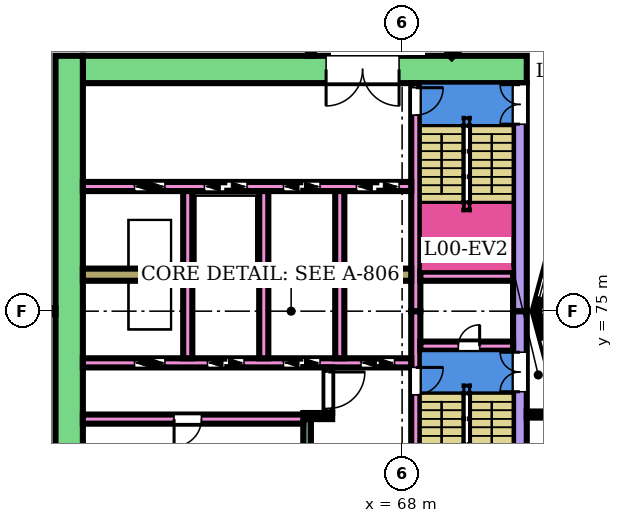
"""IFC4 building model, lengths in metres.
Left out: names, types, materials, properties, quantities, classifications, styles, units other than length and angle.
Written with IfcOpenShell. Run it as: python <this file> out.ifc"""

import sys

from ifc_helpers import new_model, si_unit, direction, frame, frame_2d, origin, place, context, subcontext, project, spatial, rectangle, extrude, element, fill, save


model = new_model("IFC4")
c1 = context("Model", 3, precision=1e-05, world=origin(), true_north=direction((0.0, 1.0)))
c2 = subcontext(c1, "Body", "Model", "MODEL_VIEW")
j1 = project(units=[si_unit("LENGTHUNIT", "METRE"), si_unit("PLANEANGLEUNIT", "RADIAN")], contexts=[c1])
p1 = place(None, origin())
s1 = spatial("IfcSite", under=j1, at=p1, CompositionType="ELEMENT")
p2 = place(p1, origin())
s2 = spatial("IfcBuilding", under=s1, at=p2, CompositionType="ELEMENT")
p3 = place(p2, origin())
s3 = spatial("IfcBuildingStorey", under=s2, at=p3, CompositionType="ELEMENT", Elevation=0.0)
p4 = place(p3, frame((72.1, 82.95, 0.0), z_axis=(0.0, 0.0, 1.0), x_axis=(-1.0, 0.0, 0.0)))
e1 = element("IfcWall", 1, at=p4, inside=s3, PredefinedType="SHEAR", context=c2, shape_type="SweptSolid", body=[
    extrude(rectangle(XDim=14.6, YDim=0.9, at=frame_2d((7.3, 0.0))), origin(), (0.0, 0.0, 1.0), 6.55),
])
p5 = place(p4, frame((4.2, 0.0, 0.0)))
e2 = element("IfcOpeningElement", 2, at=p5, cuts=e1, PredefinedType="OPENING", context=c2, shape_type="SweptSolid", body=[
    extrude(rectangle(XDim=2.4, YDim=2.4, at=frame_2d((1.2, 1.2))), frame((0.0, 0.46, 0.0), z_axis=(0.0, -1.0, 0.0), x_axis=(1.0, 0.0, 0.0)), (0.0, 0.0, 1.0), 0.92),
])
p6 = place(p3, frame((71.875, 75.0, 0.0), z_axis=(0.0, 0.0, 1.0), x_axis=(0.0, -1.0, 0.0)))
e3 = element("IfcWall", 3, at=p6, inside=s3, PredefinedType="SHEAR", context=c2, shape_type="SweptSolid", body=[
    extrude(rectangle(XDim=7.5, YDim=0.45, at=frame_2d((3.75, 0.0))), origin(), (0.0, 0.0, 1.0), 6.55),
])
p7 = place(p6, frame((1.35, 0.0, 0.0)))
e4 = element("IfcOpeningElement", 4, at=p7, cuts=e3, PredefinedType="OPENING", context=c2, shape_type="SweptSolid", body=[
    extrude(rectangle(XDim=1.3, YDim=2.4, at=frame_2d((0.65, 1.2))), frame((0.0, 0.235, 0.0), z_axis=(0.0, -1.0, 0.0), x_axis=(1.0, 0.0, 0.0)), (0.0, 0.0, 1.0), 0.47),
])
p8 = place(p3, frame((71.875, 82.5, 0.0), z_axis=(0.0, 0.0, 1.0), x_axis=(0.0, -1.0, 0.0)))
e5 = element("IfcWall", 5, at=p8, inside=s3, PredefinedType="SHEAR", context=c2, shape_type="SweptSolid", body=[
    extrude(rectangle(XDim=7.5, YDim=0.45, at=frame_2d((3.75, 0.0))), origin(), (0.0, 0.0, 1.0), 6.55),
])
p9 = place(p8, frame((0.05, 0.0, 0.0)))
e6 = element("IfcOpeningElement", 6, at=p9, cuts=e5, PredefinedType="OPENING", context=c2, shape_type="SweptSolid", body=[
    extrude(rectangle(XDim=1.3, YDim=2.4, at=frame_2d((0.65, 1.2))), frame((0.0, 0.235, 0.0), z_axis=(0.0, -1.0, 0.0), x_axis=(1.0, 0.0, 0.0)), (0.0, 0.0, 1.0), 0.47),
])
p10 = place(p3, frame((57.05, 83.4, 0.0), z_axis=(0.0, 0.0, 1.0), x_axis=(0.0, -1.0, 0.0)))
e7 = element("IfcWall", 7, at=p10, inside=s3, PredefinedType="SHEAR", context=c2, shape_type="SweptSolid", body=[
    extrude(rectangle(XDim=16.8, YDim=0.9, at=frame_2d((8.4, 0.0))), origin(), (0.0, 0.0, 1.0), 6.55),
])
p11 = place(p3, frame((68.45, 75.0, 0.0), z_axis=(0.0, 0.0, 1.0), x_axis=(0.0, -1.0, 0.0)))
e8 = element("IfcWall", 8, at=p11, inside=s3, PredefinedType="SHEAR", context=c2, shape_type="SweptSolid", body=[
    extrude(rectangle(XDim=7.5, YDim=0.3, at=frame_2d((3.75, 0.0))), origin(), (0.0, 0.0, 1.0), 6.55),
])
p12 = place(p11, frame((1.85, 0.0, 0.0)))
e9 = element("IfcOpeningElement", 9, at=p12, cuts=e8, PredefinedType="OPENING", context=c2, shape_type="SweptSolid", body=[
    extrude(rectangle(XDim=0.9, YDim=2.1, at=frame_2d((0.45, 1.05))), frame((0.0, 0.16, 0.0), z_axis=(0.0, -1.0, 0.0), x_axis=(1.0, 0.0, 0.0)), (0.0, 0.0, 1.0), 0.32),
])
p13 = place(p3, frame((68.45, 82.5, 0.0), z_axis=(0.0, 0.0, 1.0), x_axis=(0.0, -1.0, 0.0)))
e10 = element("IfcWall", 10, at=p13, inside=s3, PredefinedType="SHEAR", context=c2, shape_type="SweptSolid", body=[
    extrude(rectangle(XDim=7.5, YDim=0.3, at=frame_2d((3.75, 0.0))), origin(), (0.0, 0.0, 1.0), 6.55),
])
p14 = place(p13, frame((0.15, 0.0, 0.0)))
e11 = element("IfcOpeningElement", 11, at=p14, cuts=e10, PredefinedType="OPENING", context=c2, shape_type="SweptSolid", body=[
    extrude(rectangle(XDim=0.9, YDim=2.1, at=frame_2d((0.45, 1.05))), frame((0.0, 0.16, 0.0), z_axis=(0.0, -1.0, 0.0), x_axis=(1.0, 0.0, 0.0)), (0.0, 0.0, 1.0), 0.32),
])
p15 = place(p3, frame((71.65, 73.85, 0.0), z_axis=(0.0, 0.0, 1.0), x_axis=(-1.0, 0.0, 0.0)))
e12 = element("IfcWall", 12, at=p15, inside=s3, PredefinedType="SHEAR", context=c2, shape_type="SweptSolid", body=[
    extrude(rectangle(XDim=3.05, YDim=0.3, at=frame_2d((1.525, 0.0))), origin(), (0.0, 0.0, 1.0), 6.55),
])
p16 = place(p15, frame((1.1, 0.0, 0.0)))
e13 = element("IfcOpeningElement", 13, at=p16, cuts=e12, PredefinedType="OPENING", context=c2, shape_type="SweptSolid", body=[
    extrude(rectangle(XDim=0.7, YDim=2.0, at=frame_2d((0.35, 1.0))), frame((0.0, 0.16, 0.0), z_axis=(0.0, -1.0, 0.0), x_axis=(1.0, 0.0, 0.0)), (0.0, 0.0, 1.0), 0.32),
])
p17 = place(p3, frame((71.65, 76.15, 0.0), z_axis=(0.0, 0.0, 1.0), x_axis=(-1.0, 0.0, 0.0)))
e14 = element("IfcWall", 14, at=p17, inside=s3, PredefinedType="SHEAR", context=c2, shape_type="SweptSolid", body=[
    extrude(rectangle(XDim=3.05, YDim=0.3, at=frame_2d((1.525, 0.0))), origin(), (0.0, 0.0, 1.0), 6.55),
])
p18 = place(p3, frame((68.3, 73.3, 0.0), z_axis=(0.0, 0.0, 1.0), x_axis=(-1.0, 0.0, 0.0)))
e15 = element("IfcWall", 15, at=p18, inside=s3, PredefinedType="SHEAR", context=c2, shape_type="SweptSolid", body=[
    extrude(rectangle(XDim=10.8, YDim=0.3, at=frame_2d((5.4, 0.0))), origin(), (0.0, 0.0, 1.0), 6.55),
])
p19 = place(p18, frame((0.55, 0.0, 0.0)))
e16 = element("IfcOpeningElement", 16, at=p19, cuts=e15, PredefinedType="OPENING", context=c2, shape_type="SweptSolid", body=[
    extrude(rectangle(XDim=1.1, YDim=2.1, at=frame_2d((0.55, 1.05))), frame((0.0, 0.16, 0.0), z_axis=(0.0, -1.0, 0.0), x_axis=(1.0, 0.0, 0.0)), (0.0, 0.0, 1.0), 0.32),
])
p20 = place(p18, frame((3.0, 0.0, 0.0)))
e17 = element("IfcOpeningElement", 17, at=p20, cuts=e15, PredefinedType="OPENING", context=c2, shape_type="SweptSolid", body=[
    extrude(rectangle(XDim=1.2, YDim=2.1, at=frame_2d((0.6, 1.05))), frame((0.0, 0.16, 0.0), z_axis=(0.0, -1.0, 0.0), x_axis=(1.0, 0.0, 0.0)), (0.0, 0.0, 1.0), 0.32),
])
p21 = place(p18, frame((5.5, 0.0, 0.0)))
e18 = element("IfcOpeningElement", 18, at=p21, cuts=e15, PredefinedType="OPENING", context=c2, shape_type="SweptSolid", body=[
    extrude(rectangle(XDim=1.2, YDim=2.1, at=frame_2d((0.6, 1.05))), frame((0.0, 0.16, 0.0), z_axis=(0.0, -1.0, 0.0), x_axis=(1.0, 0.0, 0.0)), (0.0, 0.0, 1.0), 0.32),
])
p22 = place(p18, frame((8.1, 0.0, 0.0)))
e19 = element("IfcOpeningElement", 19, at=p22, cuts=e15, PredefinedType="OPENING", context=c2, shape_type="SweptSolid", body=[
    extrude(rectangle(XDim=1.0, YDim=2.1, at=frame_2d((0.5, 1.05))), frame((0.0, 0.16, 0.0), z_axis=(0.0, -1.0, 0.0), x_axis=(1.0, 0.0, 0.0)), (0.0, 0.0, 1.0), 0.32),
])
p23 = place(p3, frame((68.3, 76.2, 0.0), z_axis=(0.0, 0.0, 1.0), x_axis=(-1.0, 0.0, 0.0)))
e20 = element("IfcWall", 20, at=p23, inside=s3, PredefinedType="SHEAR", context=c2, shape_type="SweptSolid", body=[
    extrude(rectangle(XDim=10.8, YDim=0.4, at=frame_2d((5.4, 0.0))), origin(), (0.0, 0.0, 1.0), 6.55),
])
p24 = place(p3, frame((68.3, 79.1, 0.0), z_axis=(0.0, 0.0, 1.0), x_axis=(-1.0, 0.0, 0.0)))
e21 = element("IfcWall", 21, at=p24, inside=s3, PredefinedType="SHEAR", context=c2, shape_type="SweptSolid", body=[
    extrude(rectangle(XDim=10.8, YDim=0.3, at=frame_2d((5.4, 0.0))), origin(), (0.0, 0.0, 1.0), 6.55),
])
p25 = place(p24, frame((0.4, 0.0, 0.0)))
e22 = element("IfcOpeningElement", 22, at=p25, cuts=e21, PredefinedType="OPENING", context=c2, shape_type="SweptSolid", body=[
    extrude(rectangle(XDim=1.4, YDim=2.1, at=frame_2d((0.7, 1.05))), frame((0.0, 0.16, 0.0), z_axis=(0.0, -1.0, 0.0), x_axis=(1.0, 0.0, 0.0)), (0.0, 0.0, 1.0), 0.32),
])
p26 = place(p24, frame((3.0, 0.0, 0.0)))
e23 = element("IfcOpeningElement", 23, at=p26, cuts=e21, PredefinedType="OPENING", context=c2, shape_type="SweptSolid", body=[
    extrude(rectangle(XDim=1.2, YDim=2.1, at=frame_2d((0.6, 1.05))), frame((0.0, 0.16, 0.0), z_axis=(0.0, -1.0, 0.0), x_axis=(1.0, 0.0, 0.0)), (0.0, 0.0, 1.0), 0.32),
])
p27 = place(p24, frame((5.4, 0.0, 0.0)))
e24 = element("IfcOpeningElement", 24, at=p27, cuts=e21, PredefinedType="OPENING", context=c2, shape_type="SweptSolid", body=[
    extrude(rectangle(XDim=1.4, YDim=2.1, at=frame_2d((0.7, 1.05))), frame((0.0, 0.16, 0.0), z_axis=(0.0, -1.0, 0.0), x_axis=(1.0, 0.0, 0.0)), (0.0, 0.0, 1.0), 0.32),
])
p28 = place(p24, frame((8.1, 0.0, 0.0)))
e25 = element("IfcOpeningElement", 25, at=p28, cuts=e21, PredefinedType="OPENING", context=c2, shape_type="SweptSolid", body=[
    extrude(rectangle(XDim=1.0, YDim=2.1, at=frame_2d((0.5, 1.05))), frame((0.0, 0.16, 0.0), z_axis=(0.0, -1.0, 0.0), x_axis=(1.0, 0.0, 0.0)), (0.0, 0.0, 1.0), 0.32),
])
for number, where, z_axis, x_axis in (
    (26, (65.95, 76.0, 0.0), (0.0, 0.0, 1.0), (0.0, -1.0, 0.0)),
    (27, (63.45, 76.0, 0.0), (0.0, 0.0, 1.0), (0.0, -1.0, 0.0)),
    (28, (60.95, 76.0, 0.0), (0.0, 0.0, 1.0), (0.0, -1.0, 0.0)),
    (29, (65.95, 78.95, 0.0), (0.0, 0.0, 1.0), (0.0, -1.0, 0.0)),
    (30, (63.45, 78.95, 0.0), (0.0, 0.0, 1.0), (0.0, -1.0, 0.0)),
    (31, (60.95, 78.95, 0.0), (0.0, 0.0, 1.0), (0.0, -1.0, 0.0)),
):
    element("IfcWall", number, at=place(p3, frame(where, z_axis=z_axis, x_axis=x_axis)), inside=s3, PredefinedType="SHEAR", context=c2, shape_type="SweptSolid", body=[
        extrude(rectangle(XDim=2.55, YDim=0.3, at=frame_2d((1.275, 0.0))), origin(), (0.0, 0.0, 1.0), 6.55),
    ])
p29 = place(p3, frame((64.875, 71.45, 0.0), z_axis=(0.0, 0.0, 1.0), x_axis=(0.0, -1.0, 0.0)))
e32 = element("IfcWall", 32, at=p29, inside=s3, PredefinedType="SHEAR", context=c2, shape_type="SweptSolid", body=[
    extrude(rectangle(XDim=3.95, YDim=0.25, at=frame_2d((1.975, 0.0))), origin(), (0.0, 0.0, 1.0), 6.55),
])
p30 = place(p3, frame((65.7, 71.55, 0.0), z_axis=(0.0, 0.0, 1.0), x_axis=(-1.0, 0.0, 0.0)))
e33 = element("IfcWall", 33, at=p30, inside=s3, PredefinedType="SHEAR", context=c2, shape_type="SweptSolid", body=[
    extrude(rectangle(XDim=0.95, YDim=0.2, at=frame_2d((0.475, 0.0))), origin(), (0.0, 0.0, 1.0), 6.55),
])
p31 = place(p3, frame((65.575, 73.15, 0.0), z_axis=(0.0, 0.0, 1.0), x_axis=(0.0, -1.0, 0.0)))
e34 = element("IfcWall", 34, at=p31, inside=s3, PredefinedType="SHEAR", context=c2, shape_type="SweptSolid", body=[
    extrude(rectangle(XDim=1.5, YDim=0.25, at=frame_2d((0.75, 0.0))), origin(), (0.0, 0.0, 1.0), 6.55),
])
p32 = place(p31, frame((0.15, 0.0, 0.0)))
e35 = element("IfcOpeningElement", 35, at=p32, cuts=e34, PredefinedType="OPENING", context=c2, shape_type="SweptSolid", body=[
    extrude(rectangle(XDim=1.2, YDim=2.1, at=frame_2d((0.6, 1.05))), frame((0.0, 0.135, 0.0), z_axis=(0.0, -1.0, 0.0), x_axis=(1.0, 0.0, 0.0)), (0.0, 0.0, 1.0), 0.27),
])
p33 = place(p3, frame((64.75, 71.45, 0.0), z_axis=(0.0, 0.0, 1.0), x_axis=(-1.0, 0.0, 0.0)))
e36 = element("IfcWall", 36, at=p33, inside=s3, PredefinedType="SHEAR", context=c2, shape_type="SweptSolid", body=[
    extrude(rectangle(XDim=7.25, YDim=0.3, at=frame_2d((3.625, 0.0))), origin(), (0.0, 0.0, 1.0), 6.55),
])
p34 = place(p33, frame((3.35, 0.0, 0.0)))
e37 = element("IfcOpeningElement", 37, at=p34, cuts=e36, PredefinedType="OPENING", context=c2, shape_type="SweptSolid", body=[
    extrude(rectangle(XDim=0.9, YDim=2.1, at=frame_2d((0.45, 1.05))), frame((0.0, 0.16, 0.0), z_axis=(0.0, -1.0, 0.0), x_axis=(1.0, 0.0, 0.0)), (0.0, 0.0, 1.0), 0.32),
])
p35 = place(p3, frame((73.415, 78.802, 0.0), z_axis=(0.0, 0.0, 1.0), x_axis=(-0.258789828301, -0.965933654434, 0.0)))
e38 = element("IfcWall", 38, at=p35, inside=s3, PredefinedType="NOTDEFINED", context=c2, shape_type="SweptSolid", body=[
    extrude(rectangle(XDim=3.936, YDim=0.2, at=frame_2d((1.968, 0.0))), origin(), (0.0, 0.0, 1.0), 7.0),
])
p36 = place(p35, frame((0.468, 0.0, 0.9)))
e39 = element("IfcOpeningElement", 39, at=p36, cuts=e38, PredefinedType="OPENING", context=c2, shape_type="SweptSolid", body=[
    extrude(rectangle(XDim=3.0, YDim=2.3, at=frame_2d((1.5, 1.15))), frame((0.0, 0.11, 0.0), z_axis=(0.0, -1.0, 0.0), x_axis=(1.0, 0.0, 0.0)), (0.0, 0.0, 1.0), 0.22),
])
p37 = place(p3, frame((72.396, 75.0, 0.0), z_axis=(0.0, 0.0, 1.0), x_axis=(0.258789828301, -0.965933654434, 0.0)))
e40 = element("IfcWall", 40, at=p37, inside=s3, PredefinedType="NOTDEFINED", context=c2, shape_type="SweptSolid", body=[
    extrude(rectangle(XDim=3.936, YDim=0.2, at=frame_2d((1.968, 0.0))), origin(), (0.0, 0.0, 1.0), 7.0),
])
p38 = place(p37, frame((0.968, 0.0, 0.0)))
e41 = element("IfcOpeningElement", 41, at=p38, cuts=e40, PredefinedType="OPENING", context=c2, shape_type="SweptSolid", body=[
    extrude(rectangle(XDim=2.0, YDim=2.4, at=frame_2d((1.0, 1.2))), frame((0.0, 0.11, 0.0), z_axis=(0.0, -1.0, 0.0), x_axis=(1.0, 0.0, 0.0)), (0.0, 0.0, 1.0), 0.22),
])
p39 = place(p3, frame((34.203, 75.0, 0.0), z_axis=(0.0, 0.0, 1.0), x_axis=(1.0, 0.0, 0.0)))
e42 = element("IfcWall", 42, at=p39, inside=s3, PredefinedType="PARTITIONING", context=c2, shape_type="SweptSolid", body=[
    extrude(rectangle(XDim=22.396, YDim=0.2, at=frame_2d((11.198, 0.0))), origin(), (0.0, 0.0, 1.0), 5.65),
])
p40 = place(p3, frame((65.0, 83.401, 0.0), z_axis=(0.0, 0.0, 1.0), x_axis=(0.0, 1.0, 0.0)))
e43 = element("IfcWall", 43, at=p40, inside=s3, PredefinedType="PARTITIONING", context=c2, shape_type="SweptSolid", body=[
    extrude(rectangle(XDim=1.399, YDim=0.2, at=frame_2d((0.7, 0.0))), origin(), (0.0, 0.0, 1.0), 6.55),
])
p41 = place(p3, frame((69.563, 83.4, 0.0), z_axis=(0.0, 0.0, 1.0), x_axis=(0.719454254864, 0.694539829785, 0.0)))
e44 = element("IfcWall", 44, at=p41, inside=s3, PredefinedType="PARTITIONING", context=c2, shape_type="SweptSolid", body=[
    extrude(rectangle(XDim=4.86, YDim=0.2, at=frame_2d((2.43, 0.0))), origin(), (0.0, 0.0, 1.0), 6.55),
])
p42 = place(p41, frame((1.985, 0.0, 0.0)))
e45 = element("IfcOpeningElement", 45, at=p42, cuts=e44, PredefinedType="OPENING", context=c2, shape_type="SweptSolid", body=[
    extrude(rectangle(XDim=1.0, YDim=2.1, at=frame_2d((0.5, 1.05))), frame((0.0, 0.11, 0.0), z_axis=(0.0, -1.0, 0.0), x_axis=(1.0, 0.0, 0.0)), (0.0, 0.0, 1.0), 0.22),
])
p43 = place(p3, frame((73.204, 71.6, 0.0), z_axis=(0.0, 0.0, 1.0), x_axis=(-1.0, 0.0, 0.0)))
e46 = element("IfcWall", 46, at=p43, inside=s3, PredefinedType="PARTITIONING", context=c2, shape_type="SweptSolid", body=[
    extrude(rectangle(XDim=1.104, YDim=0.2, at=frame_2d((0.552, 0.0))), origin(), (0.0, 0.0, 1.0), 6.55),
])
p44 = place(p36, origin())
e47 = element("IfcWindow", 47, at=p44, inside=s3, PartitioningType="SINGLE_PANEL", PredefinedType="WINDOW", context=c2, shape_type="SweptSolid", body=[
    extrude(rectangle(XDim=3.0, YDim=2.3, at=frame_2d((1.5, 1.15))), frame((0.0, 0.03, 0.0), z_axis=(0.0, -1.0, 0.0), x_axis=(1.0, 0.0, 0.0)), (0.0, 0.0, 1.0), 0.06),
])
fill(e39, e47)
p45 = place(p38, origin())
e48 = element("IfcDoor", 48, at=p45, inside=s3, OperationType="DOUBLE_DOOR_SINGLE_SWING", PredefinedType="DOOR", context=c2, shape_type="SweptSolid", body=[
    extrude(rectangle(XDim=2.0, YDim=2.4, at=frame_2d((1.0, 1.2))), frame((0.0, 0.025, 0.0), z_axis=(0.0, -1.0, 0.0), x_axis=(1.0, 0.0, 0.0)), (0.0, 0.0, 1.0), 0.05),
])
fill(e41, e48)
p46 = place(p16, frame((0.7, 0.0, 0.0), z_axis=(0.0, 0.0, 1.0), x_axis=(-1.0, 0.0, 0.0)))
e49 = element("IfcDoor", 49, at=p46, inside=s3, OperationType="SINGLE_SWING_RIGHT", PredefinedType="DOOR", context=c2, shape_type="SweptSolid", body=[
    extrude(rectangle(XDim=0.7, YDim=2.0, at=frame_2d((0.35, 1.0))), frame((0.0, 0.025, 0.0), z_axis=(0.0, -1.0, 0.0), x_axis=(1.0, 0.0, 0.0)), (0.0, 0.0, 1.0), 0.05),
])
fill(e13, e49)
p47 = place(p12, origin())
e50 = element("IfcDoor", 50, at=p47, inside=s3, OperationType="SINGLE_SWING_LEFT", PredefinedType="DOOR", context=c2, shape_type="SweptSolid", body=[
    extrude(rectangle(XDim=0.9, YDim=2.1, at=frame_2d((0.45, 1.05))), frame((0.0, 0.025, 0.0), z_axis=(0.0, -1.0, 0.0), x_axis=(1.0, 0.0, 0.0)), (0.0, 0.0, 1.0), 0.05),
])
fill(e9, e50)
p48 = place(p14, origin())
e51 = element("IfcDoor", 51, at=p48, inside=s3, OperationType="SINGLE_SWING_LEFT", PredefinedType="DOOR", context=c2, shape_type="SweptSolid", body=[
    extrude(rectangle(XDim=0.9, YDim=2.1, at=frame_2d((0.45, 1.05))), frame((0.0, 0.025, 0.0), z_axis=(0.0, -1.0, 0.0), x_axis=(1.0, 0.0, 0.0)), (0.0, 0.0, 1.0), 0.05),
])
fill(e11, e51)
p49 = place(p7, frame((1.3, 0.0, 0.0), z_axis=(0.0, 0.0, 1.0), x_axis=(-1.0, 0.0, 0.0)))
e52 = element("IfcDoor", 52, at=p49, inside=s3, OperationType="DOUBLE_DOOR_SINGLE_SWING", PredefinedType="DOOR", context=c2, shape_type="SweptSolid", body=[
    extrude(rectangle(XDim=1.3, YDim=2.4, at=frame_2d((0.65, 1.2))), frame((0.0, 0.025, 0.0), z_axis=(0.0, -1.0, 0.0), x_axis=(1.0, 0.0, 0.0)), (0.0, 0.0, 1.0), 0.05),
])
fill(e4, e52)
p50 = place(p9, frame((1.3, 0.0, 0.0), z_axis=(0.0, 0.0, 1.0), x_axis=(-1.0, 0.0, 0.0)))
e53 = element("IfcDoor", 53, at=p50, inside=s3, OperationType="DOUBLE_DOOR_SINGLE_SWING", PredefinedType="DOOR", context=c2, shape_type="SweptSolid", body=[
    extrude(rectangle(XDim=1.3, YDim=2.4, at=frame_2d((0.65, 1.2))), frame((0.0, 0.025, 0.0), z_axis=(0.0, -1.0, 0.0), x_axis=(1.0, 0.0, 0.0)), (0.0, 0.0, 1.0), 0.05),
])
fill(e6, e53)
p51 = place(p19, origin())
e54 = element("IfcDoor", 54, at=p51, inside=s3, OperationType="DOUBLE_DOOR_SLIDING", PredefinedType="DOOR", context=c2, shape_type="SweptSolid", body=[
    extrude(rectangle(XDim=1.1, YDim=2.1, at=frame_2d((0.55, 1.05))), frame((0.0, 0.025, 0.0), z_axis=(0.0, -1.0, 0.0), x_axis=(1.0, 0.0, 0.0)), (0.0, 0.0, 1.0), 0.05),
])
fill(e16, e54)
p52 = place(p20, origin())
e55 = element("IfcDoor", 55, at=p52, inside=s3, OperationType="DOUBLE_DOOR_SLIDING", PredefinedType="DOOR", context=c2, shape_type="SweptSolid", body=[
    extrude(rectangle(XDim=1.2, YDim=2.1, at=frame_2d((0.6, 1.05))), frame((0.0, 0.025, 0.0), z_axis=(0.0, -1.0, 0.0), x_axis=(1.0, 0.0, 0.0)), (0.0, 0.0, 1.0), 0.05),
])
fill(e17, e55)
p53 = place(p21, origin())
e56 = element("IfcDoor", 56, at=p53, inside=s3, OperationType="DOUBLE_DOOR_SLIDING", PredefinedType="DOOR", context=c2, shape_type="SweptSolid", body=[
    extrude(rectangle(XDim=1.2, YDim=2.1, at=frame_2d((0.6, 1.05))), frame((0.0, 0.025, 0.0), z_axis=(0.0, -1.0, 0.0), x_axis=(1.0, 0.0, 0.0)), (0.0, 0.0, 1.0), 0.05),
])
fill(e18, e56)
p54 = place(p22, origin())
e57 = element("IfcDoor", 57, at=p54, inside=s3, OperationType="DOUBLE_DOOR_SLIDING", PredefinedType="DOOR", context=c2, shape_type="SweptSolid", body=[
    extrude(rectangle(XDim=1.0, YDim=2.1, at=frame_2d((0.5, 1.05))), frame((0.0, 0.025, 0.0), z_axis=(0.0, -1.0, 0.0), x_axis=(1.0, 0.0, 0.0)), (0.0, 0.0, 1.0), 0.05),
])
fill(e19, e57)
p55 = place(p25, origin())
e58 = element("IfcDoor", 58, at=p55, inside=s3, OperationType="DOUBLE_DOOR_SLIDING", PredefinedType="DOOR", context=c2, shape_type="SweptSolid", body=[
    extrude(rectangle(XDim=1.4, YDim=2.1, at=frame_2d((0.7, 1.05))), frame((0.0, 0.025, 0.0), z_axis=(0.0, -1.0, 0.0), x_axis=(1.0, 0.0, 0.0)), (0.0, 0.0, 1.0), 0.05),
])
fill(e22, e58)
p56 = place(p26, origin())
e59 = element("IfcDoor", 59, at=p56, inside=s3, OperationType="DOUBLE_DOOR_SLIDING", PredefinedType="DOOR", context=c2, shape_type="SweptSolid", body=[
    extrude(rectangle(XDim=1.2, YDim=2.1, at=frame_2d((0.6, 1.05))), frame((0.0, 0.025, 0.0), z_axis=(0.0, -1.0, 0.0), x_axis=(1.0, 0.0, 0.0)), (0.0, 0.0, 1.0), 0.05),
])
fill(e23, e59)
p57 = place(p27, origin())
e60 = element("IfcDoor", 60, at=p57, inside=s3, OperationType="DOUBLE_DOOR_SLIDING", PredefinedType="DOOR", context=c2, shape_type="SweptSolid", body=[
    extrude(rectangle(XDim=1.4, YDim=2.1, at=frame_2d((0.7, 1.05))), frame((0.0, 0.025, 0.0), z_axis=(0.0, -1.0, 0.0), x_axis=(1.0, 0.0, 0.0)), (0.0, 0.0, 1.0), 0.05),
])
fill(e24, e60)
p58 = place(p28, origin())
e61 = element("IfcDoor", 61, at=p58, inside=s3, OperationType="DOUBLE_DOOR_SLIDING", PredefinedType="DOOR", context=c2, shape_type="SweptSolid", body=[
    extrude(rectangle(XDim=1.0, YDim=2.1, at=frame_2d((0.5, 1.05))), frame((0.0, 0.025, 0.0), z_axis=(0.0, -1.0, 0.0), x_axis=(1.0, 0.0, 0.0)), (0.0, 0.0, 1.0), 0.05),
])
fill(e25, e61)
p59 = place(p32, origin())
e62 = element("IfcDoor", 62, at=p59, inside=s3, OperationType="SINGLE_SWING_LEFT", PredefinedType="DOOR", context=c2, shape_type="SweptSolid", body=[
    extrude(rectangle(XDim=1.2, YDim=2.1, at=frame_2d((0.6, 1.05))), frame((0.0, 0.025, 0.0), z_axis=(0.0, -1.0, 0.0), x_axis=(1.0, 0.0, 0.0)), (0.0, 0.0, 1.0), 0.05),
])
fill(e35, e62)
p60 = place(p34, origin())
e63 = element("IfcDoor", 63, at=p60, inside=s3, OperationType="SINGLE_SWING_RIGHT", PredefinedType="DOOR", context=c2, shape_type="SweptSolid", body=[
    extrude(rectangle(XDim=0.9, YDim=2.1, at=frame_2d((0.45, 1.05))), frame((0.0, 0.025, 0.0), z_axis=(0.0, -1.0, 0.0), x_axis=(1.0, 0.0, 0.0)), (0.0, 0.0, 1.0), 0.05),
])
fill(e37, e63)
p61 = place(p5, origin())
e64 = element("IfcDoor", 64, at=p61, inside=s3, OperationType="DOUBLE_DOOR_SINGLE_SWING", PredefinedType="DOOR", context=c2, shape_type="SweptSolid", body=[
    extrude(rectangle(XDim=2.4, YDim=2.4, at=frame_2d((1.2, 1.2))), frame((0.0, 0.025, 0.0), z_axis=(0.0, -1.0, 0.0), x_axis=(1.0, 0.0, 0.0)), (0.0, 0.0, 1.0), 0.05),
])
fill(e2, e64)
save(model, sys.argv[1])
